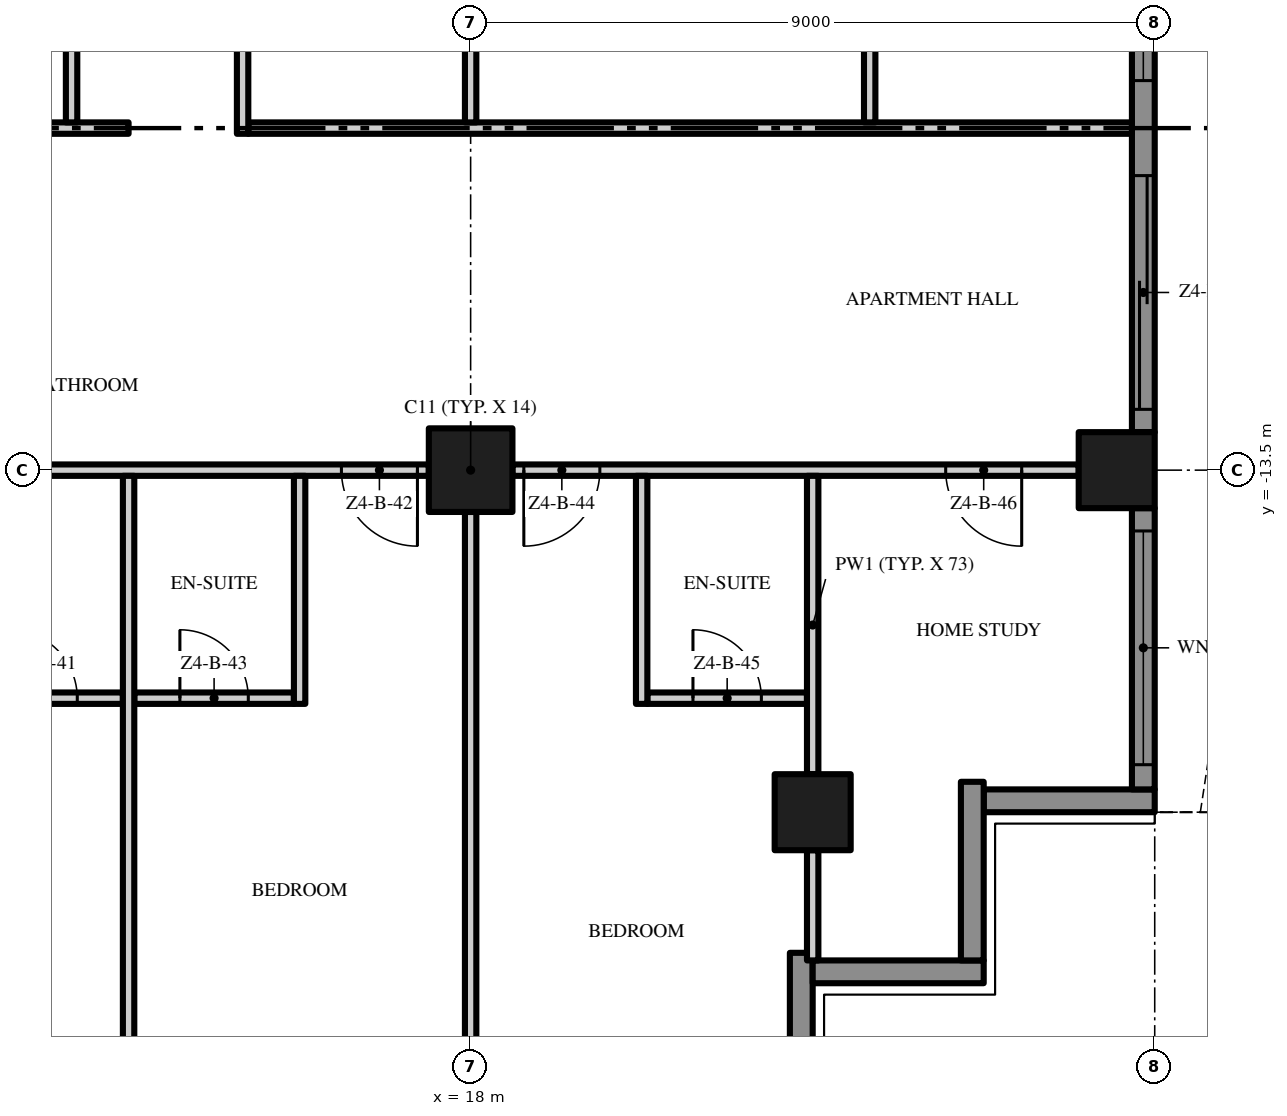
"""IFC4 building model, lengths in metres.
Left out: names, types, materials, properties, quantities, classifications, styles, units other than length and angle.
Written with IfcOpenShell. Run it as: python <this file> out.ifc"""

import sys

from ifc_helpers import new_model, si_unit, direction, frame, frame_2d, origin, origin_2d, place, context, subcontext, project, spatial, polyline, rectangle, outline, extrude, element, fill, save


model = new_model("IFC4")
c1 = context("Model", 3, precision=1e-05, world=origin(), true_north=direction((0.0, 1.0)))
c2 = subcontext(c1, "Body", "Model", "MODEL_VIEW")
j1 = project(units=[si_unit("LENGTHUNIT", "METRE"), si_unit("PLANEANGLEUNIT", "RADIAN")], contexts=[c1])
p1 = place(None, origin())
s1 = spatial("IfcSite", under=j1, at=p1, CompositionType="ELEMENT")
p2 = place(p1, origin())
s2 = spatial("IfcBuilding", under=s1, at=p2, CompositionType="ELEMENT")
p3 = place(p2, frame((0.0, 0.0, 203.4)))
s3 = spatial("IfcBuildingStorey", under=s2, at=p3, CompositionType="ELEMENT", Elevation=203.4)
p4 = place(p3, frame((18.0, -13.5, 0.0), z_axis=(0.0, 0.0, 1.0), x_axis=(1.0, 0.0, 0.0)))
e1 = element("IfcColumn", 1, at=p4, inside=s3, PredefinedType="COLUMN", context=c2, shape_type="SweptSolid", body=[
    extrude(rectangle(XDim=1.1, YDim=1.1, at=origin_2d()), origin(), (0.0, 0.0, 1.0), 3.5),
])
for number, where, z_axis, x_axis in (
    (2, (26.5, -13.5, 0.0), (0.0, 0.0, 1.0), (1.0, 0.0, 0.0)),
    (3, (22.5, -18.0, 0.0), (0.0, 0.0, 1.0), (1.0, 0.0, 0.0)),
):
    element("IfcColumn", number, at=place(p3, frame(where, z_axis=z_axis, x_axis=x_axis)), inside=s3, PredefinedType="COLUMN", context=c2, shape_type="SweptSolid", body=[
        extrude(rectangle(XDim=1.0, YDim=1.0, at=origin_2d()), origin(), (0.0, 0.0, 1.0), 3.5),
    ])
p5 = place(p3, frame((22.35, -19.85, 0.0), z_axis=(0.0, 0.0, 1.0), x_axis=(0.0, -1.0, 0.0)))
e4 = element("IfcWall", 4, at=p5, inside=s3, PredefinedType="SOLIDWALL", context=c2, shape_type="SweptSolid", body=[
    extrude(rectangle(XDim=2.35, YDim=0.3, at=frame_2d((1.175, 0.0))), origin(), (0.0, 0.0, 1.0), 3.5),
])
p6 = place(p3, frame((24.75, -20.1, 0.0), z_axis=(0.0, 0.0, 1.0), x_axis=(-1.0, 0.0, 0.0)))
e5 = element("IfcWall", 5, at=p6, inside=s3, PredefinedType="SOLIDWALL", context=c2, shape_type="SweptSolid", body=[
    extrude(rectangle(XDim=2.25, YDim=0.3, at=frame_2d((1.125, 0.0))), origin(), (0.0, 0.0, 1.0), 3.5),
])
p7 = place(p3, frame((24.6, -17.6, 0.0), z_axis=(0.0, 0.0, 1.0), x_axis=(0.0, -1.0, 0.0)))
e6 = element("IfcWall", 6, at=p7, inside=s3, PredefinedType="SOLIDWALL", context=c2, shape_type="SweptSolid", body=[
    extrude(rectangle(XDim=2.35, YDim=0.3, at=frame_2d((1.175, 0.0))), origin(), (0.0, 0.0, 1.0), 3.5),
])
p8 = place(p3, frame((27.0, -17.85, 0.0), z_axis=(0.0, 0.0, 1.0), x_axis=(-1.0, 0.0, 0.0)))
e7 = element("IfcWall", 7, at=p8, inside=s3, PredefinedType="SOLIDWALL", context=c2, shape_type="SweptSolid", body=[
    extrude(rectangle(XDim=2.25, YDim=0.3, at=frame_2d((1.125, 0.0))), origin(), (0.0, 0.0, 1.0), 3.5),
])
p9 = place(p3, frame((26.85, -14.0, 0.0), z_axis=(0.0, 0.0, 1.0), x_axis=(0.0, -1.0, 0.0)))
e8 = element("IfcWall", 8, at=p9, inside=s3, PredefinedType="SOLIDWALL", context=c2, shape_type="SweptSolid", body=[
    extrude(rectangle(XDim=3.7, YDim=0.3, at=frame_2d((1.85, 0.0))), origin(), (0.0, 0.0, 1.0), 3.5),
])
p10 = place(p9, frame((0.3, 0.0, 0.45)))
e9 = element("IfcOpeningElement", 9, at=p10, cuts=e8, PredefinedType="OPENING", context=c2, shape_type="SweptSolid", body=[
    extrude(rectangle(XDim=3.075, YDim=2.65, at=frame_2d((1.538, 1.325))), frame((0.0, 0.16, 0.0), z_axis=(0.0, -1.0, 0.0), x_axis=(1.0, 0.0, 0.0)), (0.0, 0.0, 1.0), 0.32),
])
p11 = place(p3, frame((26.85, -5.0, 0.0), z_axis=(0.0, 0.0, 1.0), x_axis=(0.0, -1.0, 0.0)))
e10 = element("IfcWall", 10, at=p11, inside=s3, PredefinedType="SOLIDWALL", context=c2, shape_type="SweptSolid", body=[
    extrude(rectangle(XDim=8.0, YDim=0.3, at=frame_2d((4.0, 0.0))), origin(), (0.0, 0.0, 1.0), 3.5),
])
p12 = place(p11, frame((4.625, 0.0, 0.0)))
e11 = element("IfcOpeningElement", 11, at=p12, cuts=e10, PredefinedType="OPENING", context=c2, shape_type="SweptSolid", body=[
    extrude(rectangle(XDim=3.075, YDim=2.4, at=frame_2d((1.538, 1.2))), frame((0.0, 0.16, 0.0), z_axis=(0.0, -1.0, 0.0), x_axis=(1.0, 0.0, 0.0)), (0.0, 0.0, 1.0), 0.32),
])
p13 = place(p11, frame((0.3, 0.0, 0.45)))
e12 = element("IfcOpeningElement", 12, at=p13, cuts=e10, PredefinedType="OPENING", context=c2, shape_type="SweptSolid", body=[
    extrude(rectangle(XDim=3.075, YDim=2.65, at=frame_2d((1.538, 1.325))), frame((0.0, 0.16, 0.0), z_axis=(0.0, -1.0, 0.0), x_axis=(1.0, 0.0, 0.0)), (0.0, 0.0, 1.0), 0.32),
])
p14 = place(p3, origin())
e13 = element("IfcWall", 13, at=p14, inside=s3, PredefinedType="USERDEFINED", context=c2, shape_type="SweptSolid", body=[
    extrude(outline(polyline([(27.6, -18.0), (27.829, -16.5), (28.429, -15.0), (29.171, -13.5), (29.771, -12.0), (30.0, -10.5), (29.771, -9.0), (29.171, -7.5), (28.429, -6.0), (27.829, -4.5), (27.6, -3.0), (27.829, -1.5), (28.429, 0.0), (29.171, 1.5), (29.771, 3.0), (30.0, 4.5), (29.771, 6.0), (29.171, 7.5), (28.429, 9.0), (27.829, 10.5), (27.6, 12.0), (27.829, 13.5), (28.429, 15.0), (29.171, 16.5), (29.771, 18.0), (29.539, 18.093), (28.942, 16.602), (28.201, 15.102), (27.586, 13.566), (27.347, 12.0), (27.586, 10.434), (28.201, 8.898), (28.942, 7.398), (29.528, 5.934), (29.747, 4.5), (29.528, 3.066), (28.942, 1.602), (28.201, 0.102), (27.586, -1.434), (27.347, -3.0), (27.586, -4.566), (28.201, -6.102), (28.942, -7.602), (29.528, -9.066), (29.747, -10.5), (29.528, -11.934), (28.942, -13.398), (28.201, -14.898), (27.586, -16.434), (27.353, -17.962), (27.6, -18.0)])), origin(), (0.0, 0.0, 1.0), 0.9),
])
p15 = place(p3, frame((11.325, -16.5, 0.0), z_axis=(0.0, 0.0, 1.0), x_axis=(1.0, 0.0, 0.0)))
e14 = element("IfcWall", 14, at=p15, inside=s3, PredefinedType="PARTITIONING", context=c2, shape_type="SweptSolid", body=[
    extrude(rectangle(XDim=2.1, YDim=0.15, at=frame_2d((1.05, 0.0))), origin(), (0.0, 0.0, 1.0), 3.5),
])
p16 = place(p15, frame((0.6, 0.0, 0.0)))
e15 = element("IfcOpeningElement", 15, at=p16, cuts=e14, PredefinedType="OPENING", context=c2, shape_type="SweptSolid", body=[
    extrude(rectangle(XDim=0.9, YDim=2.1, at=frame_2d((0.45, 1.05))), frame((0.0, 0.085, 0.0), z_axis=(0.0, -1.0, 0.0), x_axis=(1.0, 0.0, 0.0)), (0.0, 0.0, 1.0), 0.17),
])
p17 = place(p3, frame((13.575, -16.5, 0.0), z_axis=(0.0, 0.0, 1.0), x_axis=(1.0, 0.0, 0.0)))
e16 = element("IfcWall", 16, at=p17, inside=s3, PredefinedType="PARTITIONING", context=c2, shape_type="SweptSolid", body=[
    extrude(rectangle(XDim=2.1, YDim=0.15, at=frame_2d((1.05, 0.0))), origin(), (0.0, 0.0, 1.0), 3.5),
])
p18 = place(p17, frame((0.6, 0.0, 0.0)))
e17 = element("IfcOpeningElement", 17, at=p18, cuts=e16, PredefinedType="OPENING", context=c2, shape_type="SweptSolid", body=[
    extrude(rectangle(XDim=0.9, YDim=2.1, at=frame_2d((0.45, 1.05))), frame((0.0, 0.085, 0.0), z_axis=(0.0, -1.0, 0.0), x_axis=(1.0, 0.0, 0.0)), (0.0, 0.0, 1.0), 0.17),
])
p19 = place(p3, frame((20.325, -16.5, 0.0), z_axis=(0.0, 0.0, 1.0), x_axis=(1.0, 0.0, 0.0)))
e18 = element("IfcWall", 18, at=p19, inside=s3, PredefinedType="PARTITIONING", context=c2, shape_type="SweptSolid", body=[
    extrude(rectangle(XDim=2.1, YDim=0.15, at=frame_2d((1.05, 0.0))), origin(), (0.0, 0.0, 1.0), 3.5),
])
p20 = place(p19, frame((0.6, 0.0, 0.0)))
e19 = element("IfcOpeningElement", 19, at=p20, cuts=e18, PredefinedType="OPENING", context=c2, shape_type="SweptSolid", body=[
    extrude(rectangle(XDim=0.9, YDim=2.1, at=frame_2d((0.45, 1.05))), frame((0.0, 0.085, 0.0), z_axis=(0.0, -1.0, 0.0), x_axis=(1.0, 0.0, 0.0)), (0.0, 0.0, 1.0), 0.17),
])
p21 = place(p3, frame((17.45, -13.5, 0.0), z_axis=(0.0, 0.0, 1.0), x_axis=(-1.0, 0.0, 0.0)))
e20 = element("IfcWall", 20, at=p21, inside=s3, PredefinedType="PARTITIONING", context=c2, shape_type="SweptSolid", body=[
    extrude(rectangle(XDim=7.9, YDim=0.15, at=frame_2d((3.95, 0.0))), origin(), (0.0, 0.0, 1.0), 3.5),
])
p22 = place(p21, frame((6.75, 0.0, 0.0)))
e21 = element("IfcOpeningElement", 21, at=p22, cuts=e20, PredefinedType="OPENING", context=c2, shape_type="SweptSolid", body=[
    extrude(rectangle(XDim=1.0, YDim=2.4, at=frame_2d((0.5, 1.2))), frame((0.0, 0.085, 0.0), z_axis=(0.0, -1.0, 0.0), x_axis=(1.0, 0.0, 0.0)), (0.0, 0.0, 1.0), 0.17),
])
p23 = place(p21, frame((0.15, 0.0, 0.0)))
e22 = element("IfcOpeningElement", 22, at=p23, cuts=e20, PredefinedType="OPENING", context=c2, shape_type="SweptSolid", body=[
    extrude(rectangle(XDim=1.0, YDim=2.4, at=frame_2d((0.5, 1.2))), frame((0.0, 0.085, 0.0), z_axis=(0.0, -1.0, 0.0), x_axis=(1.0, 0.0, 0.0)), (0.0, 0.0, 1.0), 0.17),
])
p24 = place(p3, frame((26.0, -13.5, 0.0), z_axis=(0.0, 0.0, 1.0), x_axis=(-1.0, 0.0, 0.0)))
e23 = element("IfcWall", 23, at=p24, inside=s3, PredefinedType="PARTITIONING", context=c2, shape_type="SweptSolid", body=[
    extrude(rectangle(XDim=7.45, YDim=0.15, at=frame_2d((3.725, 0.0))), origin(), (0.0, 0.0, 1.0), 3.5),
])
p25 = place(p24, frame((6.3, 0.0, 0.0)))
e24 = element("IfcOpeningElement", 24, at=p25, cuts=e23, PredefinedType="OPENING", context=c2, shape_type="SweptSolid", body=[
    extrude(rectangle(XDim=1.0, YDim=2.4, at=frame_2d((0.5, 1.2))), frame((0.0, 0.085, 0.0), z_axis=(0.0, -1.0, 0.0), x_axis=(1.0, 0.0, 0.0)), (0.0, 0.0, 1.0), 0.17),
])
p26 = place(p24, frame((0.75, 0.0, 0.0)))
e25 = element("IfcOpeningElement", 25, at=p26, cuts=e23, PredefinedType="OPENING", context=c2, shape_type="SweptSolid", body=[
    extrude(rectangle(XDim=1.0, YDim=2.4, at=frame_2d((0.5, 1.2))), frame((0.0, 0.085, 0.0), z_axis=(0.0, -1.0, 0.0), x_axis=(1.0, 0.0, 0.0)), (0.0, 0.0, 1.0), 0.17),
])
p27 = place(p3, frame((0.1, -9.0, 0.0), z_axis=(0.0, 0.0, 1.0), x_axis=(1.0, 0.0, 0.0)))
e26 = element("IfcWall", 26, at=p27, inside=s3, PredefinedType="PARTITIONING", context=c2, shape_type="SweptSolid", body=[
    extrude(rectangle(XDim=13.4, YDim=0.15, at=frame_2d((6.7, 0.0))), origin(), (0.0, 0.0, 1.0), 3.5),
])
p28 = place(p27, frame((6.9, 0.0, 0.0)))
e27 = element("IfcOpeningElement", 27, at=p28, cuts=e26, PredefinedType="OPENING", context=c2, shape_type="SweptSolid", body=[
    extrude(rectangle(XDim=1.0, YDim=2.4, at=frame_2d((0.5, 1.2))), frame((0.0, 0.085, 0.0), z_axis=(0.0, -1.0, 0.0), x_axis=(1.0, 0.0, 0.0)), (0.0, 0.0, 1.0), 0.17),
])
p29 = place(p3, frame((15.075, -9.0, 0.0), z_axis=(0.0, 0.0, 1.0), x_axis=(1.0, 0.0, 0.0)))
e28 = element("IfcWall", 28, at=p29, inside=s3, PredefinedType="PARTITIONING", context=c2, shape_type="SweptSolid", body=[
    extrude(rectangle(XDim=11.625, YDim=0.15, at=frame_2d((5.812, 0.0))), origin(), (0.0, 0.0, 1.0), 3.5),
])
p30 = place(p3, frame((12.75, -8.925, 0.0), z_axis=(0.0, 0.0, 1.0), x_axis=(0.0, 1.0, 0.0)))
e29 = element("IfcWall", 29, at=p30, inside=s3, PredefinedType="PARTITIONING", context=c2, shape_type="SweptSolid", body=[
    extrude(rectangle(XDim=4.5, YDim=0.15, at=frame_2d((2.25, 0.0))), origin(), (0.0, 0.0, 1.0), 3.5),
])
p31 = place(p30, frame((1.75, 0.0, 0.0)))
e30 = element("IfcOpeningElement", 30, at=p31, cuts=e29, PredefinedType="OPENING", context=c2, shape_type="SweptSolid", body=[
    extrude(rectangle(XDim=0.9, YDim=2.1, at=frame_2d((0.45, 1.05))), frame((0.0, 0.085, 0.0), z_axis=(0.0, -1.0, 0.0), x_axis=(1.0, 0.0, 0.0)), (0.0, 0.0, 1.0), 0.17),
])
p32 = place(p3, frame((13.5, -22.2, 0.0), z_axis=(0.0, 0.0, 1.0), x_axis=(0.0, 1.0, 0.0)))
e31 = element("IfcWall", 31, at=p32, inside=s3, PredefinedType="PARTITIONING", context=c2, shape_type="SweptSolid", body=[
    extrude(rectangle(XDim=8.625, YDim=0.15, at=frame_2d((4.312, 0.0))), origin(), (0.0, 0.0, 1.0), 3.5),
])
p33 = place(p3, frame((15.0, -9.075, 0.0), z_axis=(0.0, 0.0, 1.0), x_axis=(0.0, 1.0, 0.0)))
e32 = element("IfcWall", 32, at=p33, inside=s3, PredefinedType="PARTITIONING", context=c2, shape_type="SweptSolid", body=[
    extrude(rectangle(XDim=4.65, YDim=0.15, at=frame_2d((2.325, 0.0))), origin(), (0.0, 0.0, 1.0), 3.5),
])
p34 = place(p3, frame((15.75, -16.575, 0.0), z_axis=(0.0, 0.0, 1.0), x_axis=(0.0, 1.0, 0.0)))
e33 = element("IfcWall", 33, at=p34, inside=s3, PredefinedType="PARTITIONING", context=c2, shape_type="SweptSolid", body=[
    extrude(rectangle(XDim=3.0, YDim=0.15, at=frame_2d((1.5, 0.0))), origin(), (0.0, 0.0, 1.0), 3.5),
])
p35 = place(p3, frame((18.0, -21.5, 0.0), z_axis=(0.0, 0.0, 1.0), x_axis=(0.0, 1.0, 0.0)))
e34 = element("IfcWall", 34, at=p35, inside=s3, PredefinedType="PARTITIONING", context=c2, shape_type="SweptSolid", body=[
    extrude(rectangle(XDim=7.45, YDim=0.15, at=frame_2d((3.725, 0.0))), origin(), (0.0, 0.0, 1.0), 3.5),
])
p36 = place(p3, frame((18.0, -8.925, 0.0), z_axis=(0.0, 0.0, 1.0), x_axis=(0.0, 1.0, 0.0)))
e35 = element("IfcWall", 35, at=p36, inside=s3, PredefinedType="PARTITIONING", context=c2, shape_type="SweptSolid", body=[
    extrude(rectangle(XDim=3.875, YDim=0.15, at=frame_2d((1.938, 0.0))), origin(), (0.0, 0.0, 1.0), 3.5),
])
p37 = place(p3, frame((20.25, -16.575, 0.0), z_axis=(0.0, 0.0, 1.0), x_axis=(0.0, 1.0, 0.0)))
e36 = element("IfcWall", 36, at=p37, inside=s3, PredefinedType="PARTITIONING", context=c2, shape_type="SweptSolid", body=[
    extrude(rectangle(XDim=3.0, YDim=0.15, at=frame_2d((1.5, 0.0))), origin(), (0.0, 0.0, 1.0), 3.5),
])
p38 = place(p3, frame((22.5, -19.95, 0.0), z_axis=(0.0, 0.0, 1.0), x_axis=(0.0, 1.0, 0.0)))
e37 = element("IfcWall", 37, at=p38, inside=s3, PredefinedType="PARTITIONING", context=c2, shape_type="SweptSolid", body=[
    extrude(rectangle(XDim=1.45, YDim=0.15, at=frame_2d((0.725, 0.0))), origin(), (0.0, 0.0, 1.0), 3.5),
])
p39 = place(p3, frame((22.5, -17.5, 0.0), z_axis=(0.0, 0.0, 1.0), x_axis=(0.0, 1.0, 0.0)))
e38 = element("IfcWall", 38, at=p39, inside=s3, PredefinedType="PARTITIONING", context=c2, shape_type="SweptSolid", body=[
    extrude(rectangle(XDim=3.925, YDim=0.15, at=frame_2d((1.962, 0.0))), origin(), (0.0, 0.0, 1.0), 3.5),
])
p40 = place(p3, frame((23.25, -4.575, 0.0), z_axis=(0.0, 0.0, 1.0), x_axis=(0.0, -1.0, 0.0)))
e39 = element("IfcWall", 39, at=p40, inside=s3, PredefinedType="PARTITIONING", context=c2, shape_type="SweptSolid", body=[
    extrude(rectangle(XDim=4.35, YDim=0.15, at=frame_2d((2.175, 0.0))), origin(), (0.0, 0.0, 1.0), 3.5),
])
p41 = place(p40, frame((1.7, 0.0, 0.0)))
e40 = element("IfcOpeningElement", 40, at=p41, cuts=e39, PredefinedType="OPENING", context=c2, shape_type="SweptSolid", body=[
    extrude(rectangle(XDim=0.9, YDim=2.1, at=frame_2d((0.45, 1.05))), frame((0.0, 0.085, 0.0), z_axis=(0.0, -1.0, 0.0), x_axis=(1.0, 0.0, 0.0)), (0.0, 0.0, 1.0), 0.17),
])
p42 = place(p10, origin())
e41 = element("IfcWindow", 41, at=p42, inside=s3, PartitioningType="SINGLE_PANEL", PredefinedType="WINDOW", context=c2, shape_type="SweptSolid", body=[
    extrude(rectangle(XDim=3.075, YDim=2.65, at=frame_2d((1.538, 1.325))), frame((0.0, 0.03, 0.0), z_axis=(0.0, -1.0, 0.0), x_axis=(1.0, 0.0, 0.0)), (0.0, 0.0, 1.0), 0.06),
])
fill(e9, e41)
p43 = place(p12, origin())
e42 = element("IfcDoor", 42, at=p43, inside=s3, OperationType="SINGLE_SWING_LEFT", PredefinedType="DOOR", context=c2, shape_type="SweptSolid", body=[
    extrude(rectangle(XDim=3.075, YDim=2.4, at=frame_2d((1.538, 1.2))), frame((0.0, 0.025, 0.0), z_axis=(0.0, -1.0, 0.0), x_axis=(1.0, 0.0, 0.0)), (0.0, 0.0, 1.0), 0.05),
])
fill(e11, e42)
p44 = place(p13, origin())
e43 = element("IfcWindow", 43, at=p44, inside=s3, PartitioningType="SINGLE_PANEL", PredefinedType="WINDOW", context=c2, shape_type="SweptSolid", body=[
    extrude(rectangle(XDim=3.075, YDim=2.65, at=frame_2d((1.538, 1.325))), frame((0.0, 0.03, 0.0), z_axis=(0.0, -1.0, 0.0), x_axis=(1.0, 0.0, 0.0)), (0.0, 0.0, 1.0), 0.06),
])
fill(e12, e43)
p45 = place(p16, origin())
e44 = element("IfcDoor", 44, at=p45, inside=s3, OperationType="SINGLE_SWING_LEFT", PredefinedType="DOOR", context=c2, shape_type="SweptSolid", body=[
    extrude(rectangle(XDim=0.9, YDim=2.1, at=frame_2d((0.45, 1.05))), frame((0.0, 0.025, 0.0), z_axis=(0.0, -1.0, 0.0), x_axis=(1.0, 0.0, 0.0)), (0.0, 0.0, 1.0), 0.05),
])
fill(e15, e44)
p46 = place(p23, origin())
e45 = element("IfcDoor", 45, at=p46, inside=s3, OperationType="SINGLE_SWING_LEFT", PredefinedType="DOOR", context=c2, shape_type="SweptSolid", body=[
    extrude(rectangle(XDim=1.0, YDim=2.4, at=frame_2d((0.5, 1.2))), frame((0.0, 0.025, 0.0), z_axis=(0.0, -1.0, 0.0), x_axis=(1.0, 0.0, 0.0)), (0.0, 0.0, 1.0), 0.05),
])
fill(e22, e45)
p47 = place(p18, origin())
e46 = element("IfcDoor", 46, at=p47, inside=s3, OperationType="SINGLE_SWING_LEFT", PredefinedType="DOOR", context=c2, shape_type="SweptSolid", body=[
    extrude(rectangle(XDim=0.9, YDim=2.1, at=frame_2d((0.45, 1.05))), frame((0.0, 0.025, 0.0), z_axis=(0.0, -1.0, 0.0), x_axis=(1.0, 0.0, 0.0)), (0.0, 0.0, 1.0), 0.05),
])
fill(e17, e46)
p48 = place(p25, origin())
e47 = element("IfcDoor", 47, at=p48, inside=s3, OperationType="SINGLE_SWING_RIGHT", PredefinedType="DOOR", context=c2, shape_type="SweptSolid", body=[
    extrude(rectangle(XDim=1.0, YDim=2.4, at=frame_2d((0.5, 1.2))), frame((0.0, 0.025, 0.0), z_axis=(0.0, -1.0, 0.0), x_axis=(1.0, 0.0, 0.0)), (0.0, 0.0, 1.0), 0.05),
])
fill(e24, e47)
p49 = place(p20, origin())
e48 = element("IfcDoor", 48, at=p49, inside=s3, OperationType="SINGLE_SWING_LEFT", PredefinedType="DOOR", context=c2, shape_type="SweptSolid", body=[
    extrude(rectangle(XDim=0.9, YDim=2.1, at=frame_2d((0.45, 1.05))), frame((0.0, 0.025, 0.0), z_axis=(0.0, -1.0, 0.0), x_axis=(1.0, 0.0, 0.0)), (0.0, 0.0, 1.0), 0.05),
])
fill(e19, e48)
p50 = place(p26, origin())
e49 = element("IfcDoor", 49, at=p50, inside=s3, OperationType="SINGLE_SWING_LEFT", PredefinedType="DOOR", context=c2, shape_type="SweptSolid", body=[
    extrude(rectangle(XDim=1.0, YDim=2.4, at=frame_2d((0.5, 1.2))), frame((0.0, 0.025, 0.0), z_axis=(0.0, -1.0, 0.0), x_axis=(1.0, 0.0, 0.0)), (0.0, 0.0, 1.0), 0.05),
])
fill(e25, e49)
save(model, sys.argv[1])
